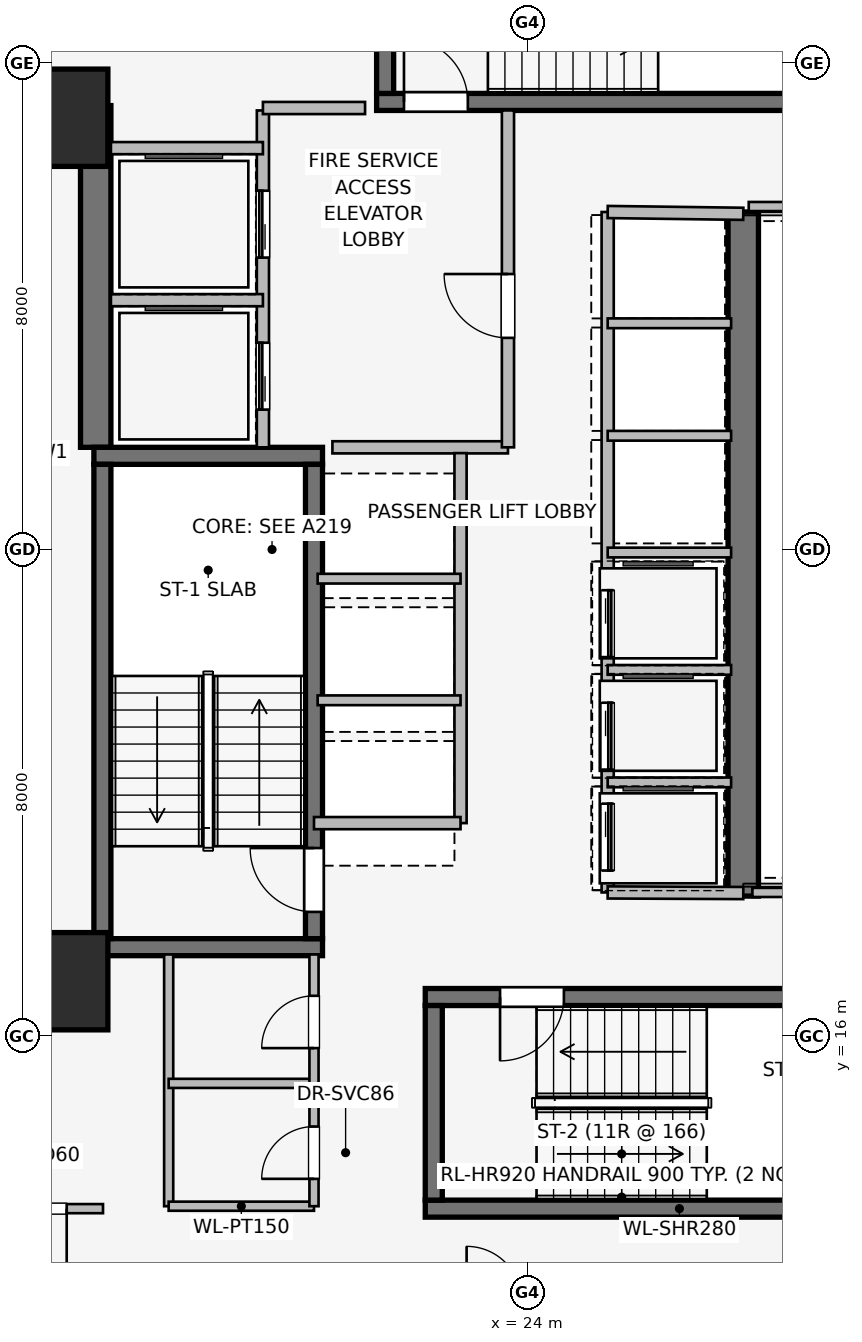
"""IFC4 building model, lengths in metres.
Left out: names, types, materials, properties, quantities, classifications, styles, units other than length and angle.
Written with IfcOpenShell. Run it as: python <this file> out.ifc"""

import sys

from ifc_helpers import new_model, si_unit, direction, frame, frame_2d, origin, origin_2d, place, context, subcontext, project, spatial, rectangle, extrude, element, fill, save


model = new_model("IFC4")
c1 = context("Model", 3, precision=1e-05, world=origin(), true_north=direction((0.0, 1.0)))
c2 = subcontext(c1, "Body", "Model", "MODEL_VIEW")
j1 = project(units=[si_unit("LENGTHUNIT", "METRE"), si_unit("PLANEANGLEUNIT", "RADIAN")], contexts=[c1])
p1 = place(None, origin())
s1 = spatial("IfcSite", under=j1, at=p1, CompositionType="ELEMENT")
p2 = place(p1, origin())
s2 = spatial("IfcBuilding", under=s1, at=p2, CompositionType="ELEMENT")
p3 = place(p2, frame((0.0, 0.0, 67.15)))
s3 = spatial("IfcBuildingStorey", under=s2, at=p3, CompositionType="ELEMENT", Elevation=67.15)
p4 = place(p3, frame((16.9, 25.68, 0.0), z_axis=(0.0, 0.0, 1.0), x_axis=(0.0, 1.0, 0.0)))
e1 = element("IfcWall", 1, at=p4, inside=s3, PredefinedType="SHEAR", context=c2, shape_type="SweptSolid", body=[
    extrude(rectangle(XDim=5.62, YDim=0.5, at=frame_2d((2.81, 0.0))), origin(), (0.0, 0.0, 1.0), 3.65),
])
p5 = place(p3, frame((27.55, 29.55, 0.0), z_axis=(0.0, 0.0, 1.0), x_axis=(0.0, -1.0, 0.0)))
e2 = element("IfcWall", 2, at=p5, inside=s3, PredefinedType="SHEAR", context=c2, shape_type="SweptSolid", body=[
    extrude(rectangle(XDim=11.25, YDim=0.5, at=frame_2d((5.625, 0.0))), origin(), (0.0, 0.0, 1.0), 3.65),
])
for number, where, z_axis, x_axis in (
    (3, (16.87, 17.46, 0.0), (0.0, 0.0, 1.0), (1.0, 0.0, 0.0)),
    (4, (20.63, 25.54, 0.0), (0.0, 0.0, 1.0), (-1.0, 0.0, 0.0)),
):
    element("IfcWall", number, at=place(p3, frame(where, z_axis=z_axis, x_axis=x_axis)), inside=s3, PredefinedType="SHEAR", context=c2, shape_type="SweptSolid", body=[
        extrude(rectangle(XDim=3.76, YDim=0.28, at=frame_2d((1.88, 0.0))), origin(), (0.0, 0.0, 1.0), 3.65),
    ])
p6 = place(p3, frame((17.01, 25.4, 0.0), z_axis=(0.0, 0.0, 1.0), x_axis=(0.0, -1.0, 0.0)))
e5 = element("IfcWall", 5, at=p6, inside=s3, PredefinedType="SHEAR", context=c2, shape_type="SweptSolid", body=[
    extrude(rectangle(XDim=7.8, YDim=0.28, at=frame_2d((3.9, 0.0))), origin(), (0.0, 0.0, 1.0), 3.65),
])
p7 = place(p3, frame((20.49, 17.6, 0.0), z_axis=(0.0, 0.0, 1.0), x_axis=(0.0, 1.0, 0.0)))
e6 = element("IfcWall", 6, at=p7, inside=s3, PredefinedType="SHEAR", context=c2, shape_type="SweptSolid", body=[
    extrude(rectangle(XDim=7.8, YDim=0.28, at=frame_2d((3.9, 0.0))), origin(), (0.0, 0.0, 1.0), 3.65),
])
p8 = place(p7, frame((0.44, 0.0, 0.0)))
e7 = element("IfcOpeningElement", 7, at=p8, cuts=e6, PredefinedType="OPENING", context=c2, shape_type="SweptSolid", body=[
    extrude(rectangle(XDim=1.05, YDim=2.0, at=frame_2d((0.525, 1.0))), frame((0.0, 0.15, 0.0), z_axis=(0.0, -1.0, 0.0), x_axis=(1.0, 0.0, 0.0)), (0.0, 0.0, 1.0), 0.3),
])
p9 = place(p3, frame((22.32, 13.16, 0.0), z_axis=(0.0, 0.0, 1.0), x_axis=(1.0, 0.0, 0.0)))
e8 = element("IfcWall", 8, at=p9, inside=s3, PredefinedType="SHEAR", context=c2, shape_type="SweptSolid", body=[
    extrude(rectangle(XDim=8.36, YDim=0.28, at=frame_2d((4.18, 0.0))), origin(), (0.0, 0.0, 1.0), 3.65),
])
p10 = place(p3, frame((30.68, 16.64, 0.0), z_axis=(0.0, 0.0, 1.0), x_axis=(-1.0, 0.0, 0.0)))
e9 = element("IfcWall", 9, at=p10, inside=s3, PredefinedType="SHEAR", context=c2, shape_type="SweptSolid", body=[
    extrude(rectangle(XDim=8.36, YDim=0.28, at=frame_2d((4.18, 0.0))), origin(), (0.0, 0.0, 1.0), 3.65),
])
p11 = place(p10, frame((6.08, 0.0, 0.0)))
e10 = element("IfcOpeningElement", 10, at=p11, cuts=e9, PredefinedType="OPENING", context=c2, shape_type="SweptSolid", body=[
    extrude(rectangle(XDim=1.05, YDim=2.0, at=frame_2d((0.525, 1.0))), frame((0.0, 0.15, 0.0), z_axis=(0.0, -1.0, 0.0), x_axis=(1.0, 0.0, 0.0)), (0.0, 0.0, 1.0), 0.3),
])
p12 = place(p3, frame((22.46, 16.5, 0.0), z_axis=(0.0, 0.0, 1.0), x_axis=(0.0, -1.0, 0.0)))
e11 = element("IfcWall", 11, at=p12, inside=s3, PredefinedType="SHEAR", context=c2, shape_type="SweptSolid", body=[
    extrude(rectangle(XDim=3.2, YDim=0.28, at=frame_2d((1.6, 0.0))), origin(), (0.0, 0.0, 1.0), 3.65),
])
p13 = place(p3, frame((21.52, 31.36, 0.0), z_axis=(0.0, 0.0, 1.0), x_axis=(1.0, 0.0, 0.0)))
e12 = element("IfcWall", 12, at=p13, inside=s3, PredefinedType="SHEAR", context=c2, shape_type="SweptSolid", body=[
    extrude(rectangle(XDim=8.36, YDim=0.28, at=frame_2d((4.18, 0.0))), origin(), (0.0, 0.0, 1.0), 3.65),
])
p14 = place(p13, frame((0.45, 0.0, 0.0)))
e13 = element("IfcOpeningElement", 13, at=p14, cuts=e12, PredefinedType="OPENING", context=c2, shape_type="SweptSolid", body=[
    extrude(rectangle(XDim=1.05, YDim=2.0, at=frame_2d((0.525, 1.0))), frame((0.0, 0.15, 0.0), z_axis=(0.0, -1.0, 0.0), x_axis=(1.0, 0.0, 0.0)), (0.0, 0.0, 1.0), 0.3),
])
p15 = place(p3, frame((21.66, 34.7, 0.0), z_axis=(0.0, 0.0, 1.0), x_axis=(0.0, -1.0, 0.0)))
e14 = element("IfcWall", 14, at=p15, inside=s3, PredefinedType="SHEAR", context=c2, shape_type="SweptSolid", body=[
    extrude(rectangle(XDim=3.2, YDim=0.28, at=frame_2d((1.6, 0.0))), origin(), (0.0, 0.0, 1.0), 3.65),
])
for number, where, z_axis, x_axis in (
    (15, (16.3, 16.9, 0.0), (0.0, 0.0, 1.0), (1.0, 0.0, 0.0)),
    (16, (16.3, 31.1, 0.0), (0.0, 0.0, 1.0), (1.0, 0.0, 0.0)),
):
    element("IfcColumn", number, at=place(p3, frame(where, z_axis=z_axis, x_axis=x_axis)), inside=s3, PredefinedType="COLUMN", context=c2, shape_type="SweptSolid", body=[
        extrude(rectangle(XDim=1.6, YDim=1.6, at=origin_2d()), origin(), (0.0, 0.0, 1.0), 3.65),
    ])
p16 = place(p3, frame((19.65, 25.68, 0.0), z_axis=(0.0, 0.0, 1.0), x_axis=(0.0, 1.0, 0.0)))
e17 = element("IfcWall", 17, at=p16, inside=s3, PredefinedType="PARTITIONING", context=c2, shape_type="SweptSolid", body=[
    extrude(rectangle(XDim=5.54, YDim=0.2, at=frame_2d((2.77, 0.0))), origin(), (0.0, 0.0, 1.0), 3.39),
])
p17 = place(p16, frame((0.62, 0.0, 0.0)))
e18 = element("IfcOpeningElement", 18, at=p17, cuts=e17, PredefinedType="OPENING", context=c2, shape_type="SweptSolid", body=[
    extrude(rectangle(XDim=1.1, YDim=2.2, at=frame_2d((0.55, 1.1))), frame((0.0, 0.11, 0.0), z_axis=(0.0, -1.0, 0.0), x_axis=(1.0, 0.0, 0.0)), (0.0, 0.0, 1.0), 0.22),
])
p18 = place(p16, frame((3.12, 0.0, 0.0)))
e19 = element("IfcOpeningElement", 19, at=p18, cuts=e17, PredefinedType="OPENING", context=c2, shape_type="SweptSolid", body=[
    extrude(rectangle(XDim=1.1, YDim=2.2, at=frame_2d((0.55, 1.1))), frame((0.0, 0.11, 0.0), z_axis=(0.0, -1.0, 0.0), x_axis=(1.0, 0.0, 0.0)), (0.0, 0.0, 1.0), 0.22),
])
p19 = place(p3, frame((20.793, 25.68, 0.0), z_axis=(0.0, 0.0, 1.0), x_axis=(1.0, 0.0, 0.0)))
e20 = element("IfcWall", 20, at=p19, inside=s3, PredefinedType="PARTITIONING", context=c2, shape_type="SweptSolid", body=[
    extrude(rectangle(XDim=2.887, YDim=0.2, at=frame_2d((1.443, 0.0))), origin(), (0.0, 0.0, 1.0), 3.39),
])
p20 = place(p3, frame((23.68, 25.68, 0.0), z_axis=(0.0, 0.0, 1.0), x_axis=(0.0, 1.0, 0.0)))
e21 = element("IfcWall", 21, at=p20, inside=s3, PredefinedType="PARTITIONING", context=c2, shape_type="SweptSolid", body=[
    extrude(rectangle(XDim=5.54, YDim=0.2, at=frame_2d((2.77, 0.0))), origin(), (0.0, 0.0, 1.0), 3.39),
])
p21 = place(p20, frame((1.8, 0.0, 0.0)))
e22 = element("IfcOpeningElement", 22, at=p21, cuts=e21, PredefinedType="OPENING", context=c2, shape_type="SweptSolid", body=[
    extrude(rectangle(XDim=1.05, YDim=2.0, at=frame_2d((0.525, 1.0))), frame((0.0, 0.11, 0.0), z_axis=(0.0, -1.0, 0.0), x_axis=(1.0, 0.0, 0.0)), (0.0, 0.0, 1.0), 0.22),
])
p22 = place(p3, frame((21.33, 31.26, 0.0), z_axis=(0.0, 0.0, 1.0), x_axis=(-1.0, 0.0, 0.0)))
e23 = element("IfcWall", 23, at=p22, inside=s3, PredefinedType="PARTITIONING", context=c2, shape_type="SweptSolid", body=[
    extrude(rectangle(XDim=1.68, YDim=0.2, at=frame_2d((0.84, 0.0))), origin(), (0.0, 0.0, 1.0), 3.39),
])
p23 = place(p3, frame((17.15, 28.1, 0.0), z_axis=(0.0, 0.0, 1.0), x_axis=(1.0, 0.0, 0.0)))
e24 = element("IfcWall", 24, at=p23, inside=s3, PredefinedType="PARTITIONING", context=c2, shape_type="SweptSolid", body=[
    extrude(rectangle(XDim=2.5, YDim=0.2, at=frame_2d((1.25, 0.0))), origin(), (0.0, 0.0, 1.0), 3.39),
])
p24 = place(p3, frame((19.65, 30.6, 0.0), z_axis=(0.0, 0.0, 1.0), x_axis=(-1.0, 0.0, 0.0)))
e25 = element("IfcWall", 25, at=p24, inside=s3, PredefinedType="PARTITIONING", context=c2, shape_type="SweptSolid", body=[
    extrude(rectangle(XDim=2.5, YDim=0.2, at=frame_2d((1.25, 0.0))), origin(), (0.0, 0.0, 1.0), 2.29),
])
p25 = place(p3, frame((22.9, 19.5, 0.0), z_axis=(0.0, 0.0, 1.0), x_axis=(0.0, 1.0, 0.0)))
e26 = element("IfcWall", 26, at=p25, inside=s3, PredefinedType="PARTITIONING", context=c2, shape_type="SweptSolid", body=[
    extrude(rectangle(XDim=6.085, YDim=0.2, at=frame_2d((3.042, 0.0))), origin(), (0.0, 0.0, 1.0), 3.39),
])
p26 = place(p3, frame((20.49, 19.5, 0.0), z_axis=(0.0, 0.0, 1.0), x_axis=(1.0, 0.0, 0.0)))
e27 = element("IfcWall", 27, at=p26, inside=s3, PredefinedType="PARTITIONING", context=c2, shape_type="SweptSolid", body=[
    extrude(rectangle(XDim=2.41, YDim=0.2, at=frame_2d((1.205, 0.0))), origin(), (0.0, 0.0, 1.0), 2.29),
])
for number, where, z_axis, x_axis in (
    (28, (20.55, 21.52, 0.0), (0.0, 0.0, 1.0), (1.0, 0.0, 0.0)),
    (29, (20.55, 23.52, 0.0), (0.0, 0.0, 1.0), (1.0, 0.0, 0.0)),
):
    element("IfcWall", number, at=place(p3, frame(where, z_axis=z_axis, x_axis=x_axis)), inside=s3, PredefinedType="PARTITIONING", context=c2, shape_type="SweptSolid", body=[
        extrude(rectangle(XDim=2.35, YDim=0.16, at=frame_2d((1.175, 0.0))), origin(), (0.0, 0.0, 1.0), 3.39),
    ])
p27 = place(p3, frame((25.32, 29.55, 0.0), z_axis=(0.0, 0.0, 1.0), x_axis=(0.0, -1.0, 0.0)))
e30 = element("IfcWall", 30, at=p27, inside=s3, PredefinedType="PARTITIONING", context=c2, shape_type="SweptSolid", body=[
    extrude(rectangle(XDim=11.19, YDim=0.2, at=frame_2d((5.595, 0.0))), origin(), (0.0, 0.0, 1.0), 3.39),
])
p28 = place(p27, frame((6.22, 0.0, 0.0)))
e31 = element("IfcOpeningElement", 31, at=p28, cuts=e30, PredefinedType="OPENING", context=c2, shape_type="SweptSolid", body=[
    extrude(rectangle(XDim=1.1, YDim=2.2, at=frame_2d((0.55, 1.1))), frame((0.0, 0.11, 0.0), z_axis=(0.0, -1.0, 0.0), x_axis=(1.0, 0.0, 0.0)), (0.0, 0.0, 1.0), 0.22),
])
p29 = place(p27, frame((8.07, 0.0, 0.0)))
e32 = element("IfcOpeningElement", 32, at=p29, cuts=e30, PredefinedType="OPENING", context=c2, shape_type="SweptSolid", body=[
    extrude(rectangle(XDim=1.1, YDim=2.2, at=frame_2d((0.55, 1.1))), frame((0.0, 0.11, 0.0), z_axis=(0.0, -1.0, 0.0), x_axis=(1.0, 0.0, 0.0)), (0.0, 0.0, 1.0), 0.22),
])
p30 = place(p27, frame((9.73, 0.0, 0.0)))
e33 = element("IfcOpeningElement", 33, at=p30, cuts=e30, PredefinedType="OPENING", context=c2, shape_type="SweptSolid", body=[
    extrude(rectangle(XDim=1.1, YDim=2.2, at=frame_2d((0.55, 1.1))), frame((0.0, 0.11, 0.0), z_axis=(0.0, -1.0, 0.0), x_axis=(1.0, 0.0, 0.0)), (0.0, 0.0, 1.0), 0.22),
])
p31 = place(p3, frame((25.32, 18.36, 0.0), z_axis=(0.0, 0.0, 1.0), x_axis=(0.999989925833, -0.004488678231, 0.0)))
e34 = element("IfcWall", 34, at=p31, inside=s3, PredefinedType="PARTITIONING", context=c2, shape_type="SweptSolid", body=[
    extrude(rectangle(XDim=2.23, YDim=0.2, at=frame_2d((1.115, 0.0))), origin(), (0.0, 0.0, 1.0), 3.39),
])
p32 = place(p3, frame((27.55, 29.52, 0.0), z_axis=(0.0, 0.0, 1.0), x_axis=(-0.999909343457, 0.013464949556, 0.0)))
e35 = element("IfcWall", 35, at=p32, inside=s3, PredefinedType="PARTITIONING", context=c2, shape_type="SweptSolid", body=[
    extrude(rectangle(XDim=2.23, YDim=0.2, at=frame_2d((1.115, 0.0))), origin(), (0.0, 0.0, 1.0), 2.29),
])
for number, where, z_axis, x_axis in (
    (36, (25.32, 20.17, 0.0), (0.0, 0.0, 1.0), (1.0, 0.0, 0.0)),
    (37, (25.32, 22.02, 0.0), (0.0, 0.0, 1.0), (1.0, 0.0, 0.0)),
    (38, (25.32, 23.95, 0.0), (0.0, 0.0, 1.0), (1.0, 0.0, 0.0)),
    (39, (25.32, 25.87, 0.0), (0.0, 0.0, 1.0), (1.0, 0.0, 0.0)),
    (40, (25.32, 27.72, 0.0), (0.0, 0.0, 1.0), (1.0, 0.0, 0.0)),
):
    element("IfcWall", number, at=place(p3, frame(where, z_axis=z_axis, x_axis=x_axis)), inside=s3, PredefinedType="PARTITIONING", context=c2, shape_type="SweptSolid", body=[
        extrude(rectangle(XDim=2.03, YDim=0.16, at=frame_2d((1.015, 0.0))), origin(), (0.0, 0.0, 1.0), 3.39),
    ])
p33 = place(p3, frame((18.1, 17.34, 0.0), z_axis=(0.0, 0.0, 1.0), x_axis=(0.0, -1.0, 0.0)))
e41 = element("IfcWall", 41, at=p33, inside=s3, PredefinedType="PARTITIONING", context=c2, shape_type="SweptSolid", body=[
    extrude(rectangle(XDim=4.14, YDim=0.15, at=frame_2d((2.07, 0.0))), origin(), (0.0, 0.0, 1.0), 3.39),
])
for number, where, z_axis, x_axis in (
    (42, (18.1, 13.2, 0.0), (0.0, 0.0, 1.0), (1.0, 0.0, 0.0)),
    (43, (18.1, 15.22, 0.0), (0.0, 0.0, 1.0), (1.0, 0.0, 0.0)),
):
    element("IfcWall", number, at=place(p3, frame(where, z_axis=z_axis, x_axis=x_axis)), inside=s3, PredefinedType="PARTITIONING", context=c2, shape_type="SweptSolid", body=[
        extrude(rectangle(XDim=2.39, YDim=0.15, at=frame_2d((1.195, 0.0))), origin(), (0.0, 0.0, 1.0), 3.39),
    ])
p34 = place(p3, frame((20.49, 13.2, 0.0), z_axis=(0.0, 0.0, 1.0), x_axis=(0.0, 1.0, 0.0)))
e44 = element("IfcWall", 44, at=p34, inside=s3, PredefinedType="PARTITIONING", context=c2, shape_type="SweptSolid", body=[
    extrude(rectangle(XDim=4.14, YDim=0.15, at=frame_2d((2.07, 0.0))), origin(), (0.0, 0.0, 1.0), 3.39),
])
p35 = place(p34, frame((0.45, 0.0, 0.0)))
e45 = element("IfcOpeningElement", 45, at=p35, cuts=e44, PredefinedType="OPENING", context=c2, shape_type="SweptSolid", body=[
    extrude(rectangle(XDim=0.86, YDim=2.0, at=frame_2d((0.43, 1.0))), frame((0.0, 0.085, 0.0), z_axis=(0.0, -1.0, 0.0), x_axis=(1.0, 0.0, 0.0)), (0.0, 0.0, 1.0), 0.17),
])
p36 = place(p34, frame((2.6, 0.0, 0.0)))
e46 = element("IfcOpeningElement", 46, at=p36, cuts=e44, PredefinedType="OPENING", context=c2, shape_type="SweptSolid", body=[
    extrude(rectangle(XDim=0.86, YDim=2.0, at=frame_2d((0.43, 1.0))), frame((0.0, 0.085, 0.0), z_axis=(0.0, -1.0, 0.0), x_axis=(1.0, 0.0, 0.0)), (0.0, 0.0, 1.0), 0.17),
])
p37 = place(p3, frame((27.7, 18.36, 0.0), z_axis=(0.0, 0.0, 1.0), x_axis=(1.0, 0.0, 0.0)))
e47 = element("IfcWall", 47, at=p37, inside=s3, PredefinedType="PARTITIONING", context=c2, shape_type="SweptSolid", body=[
    extrude(rectangle(XDim=12.14, YDim=0.15, at=frame_2d((6.07, 0.0))), origin(), (0.0, 0.0, 1.0), 2.531),
])
p38 = place(p3, frame((39.84, 29.64, 0.0), z_axis=(0.0, 0.0, 1.0), x_axis=(-1.0, 0.0, 0.0)))
e48 = element("IfcWall", 48, at=p38, inside=s3, PredefinedType="PARTITIONING", context=c2, shape_type="SweptSolid", body=[
    extrude(rectangle(XDim=12.2, YDim=0.15, at=frame_2d((6.1, 0.0))), origin(), (0.0, 0.0, 1.0), 2.531),
])
p39 = place(p3, frame((17.02, 13.16, 0.0), z_axis=(0.0, 0.0, 1.0), x_axis=(-1.0, 0.0, 0.0)))
e49 = element("IfcWall", 49, at=p39, inside=s3, PredefinedType="PARTITIONING", context=c2, shape_type="SweptSolid", body=[
    extrude(rectangle(XDim=2.12, YDim=0.15, at=frame_2d((1.06, 0.0))), origin(), (0.0, 0.0, 1.0), 3.39),
])
p40 = place(p39, frame((0.597, 0.0, 0.0)))
e50 = element("IfcOpeningElement", 50, at=p40, cuts=e49, PredefinedType="OPENING", context=c2, shape_type="SweptSolid", body=[
    extrude(rectangle(XDim=0.96, YDim=2.0, at=frame_2d((0.48, 1.0))), frame((0.0, 0.085, 0.0), z_axis=(0.0, -1.0, 0.0), x_axis=(1.0, 0.0, 0.0)), (0.0, 0.0, 1.0), 0.17),
])
p41 = place(p8, origin())
e51 = element("IfcDoor", 51, at=p41, inside=s3, OperationType="SINGLE_SWING_RIGHT", PredefinedType="DOOR", context=c2, shape_type="SweptSolid", body=[
    extrude(rectangle(XDim=1.05, YDim=2.0, at=frame_2d((0.525, 1.0))), frame((0.0, 0.025, 0.0), z_axis=(0.0, -1.0, 0.0), x_axis=(1.0, 0.0, 0.0)), (0.0, 0.0, 1.0), 0.05),
])
fill(e7, e51)
p42 = place(p11, origin())
e52 = element("IfcDoor", 52, at=p42, inside=s3, OperationType="SINGLE_SWING_RIGHT", PredefinedType="DOOR", context=c2, shape_type="SweptSolid", body=[
    extrude(rectangle(XDim=1.05, YDim=2.0, at=frame_2d((0.525, 1.0))), frame((0.0, 0.025, 0.0), z_axis=(0.0, -1.0, 0.0), x_axis=(1.0, 0.0, 0.0)), (0.0, 0.0, 1.0), 0.05),
])
fill(e10, e52)
p43 = place(p14, origin())
e53 = element("IfcDoor", 53, at=p43, inside=s3, OperationType="SINGLE_SWING_LEFT", PredefinedType="DOOR", context=c2, shape_type="SweptSolid", body=[
    extrude(rectangle(XDim=1.05, YDim=2.0, at=frame_2d((0.525, 1.0))), frame((0.0, 0.025, 0.0), z_axis=(0.0, -1.0, 0.0), x_axis=(1.0, 0.0, 0.0)), (0.0, 0.0, 1.0), 0.05),
])
fill(e13, e53)
p44 = place(p17, origin())
e54 = element("IfcDoor", 54, at=p44, inside=s3, OperationType="SLIDING_TO_LEFT", PredefinedType="DOOR", context=c2, shape_type="SweptSolid", body=[
    extrude(rectangle(XDim=1.1, YDim=2.2, at=frame_2d((0.55, 1.1))), frame((0.0, 0.025, 0.0), z_axis=(0.0, -1.0, 0.0), x_axis=(1.0, 0.0, 0.0)), (0.0, 0.0, 1.0), 0.05),
])
fill(e18, e54)
p45 = place(p18, origin())
e55 = element("IfcDoor", 55, at=p45, inside=s3, OperationType="SLIDING_TO_LEFT", PredefinedType="DOOR", context=c2, shape_type="SweptSolid", body=[
    extrude(rectangle(XDim=1.1, YDim=2.2, at=frame_2d((0.55, 1.1))), frame((0.0, 0.025, 0.0), z_axis=(0.0, -1.0, 0.0), x_axis=(1.0, 0.0, 0.0)), (0.0, 0.0, 1.0), 0.05),
])
fill(e19, e55)
p46 = place(p21, origin())
e56 = element("IfcDoor", 56, at=p46, inside=s3, OperationType="SINGLE_SWING_RIGHT", PredefinedType="DOOR", context=c2, shape_type="SweptSolid", body=[
    extrude(rectangle(XDim=1.05, YDim=2.0, at=frame_2d((0.525, 1.0))), frame((0.0, 0.025, 0.0), z_axis=(0.0, -1.0, 0.0), x_axis=(1.0, 0.0, 0.0)), (0.0, 0.0, 1.0), 0.05),
])
fill(e22, e56)
p47 = place(p28, origin())
e57 = element("IfcDoor", 57, at=p47, inside=s3, OperationType="SLIDING_TO_LEFT", PredefinedType="DOOR", context=c2, shape_type="SweptSolid", body=[
    extrude(rectangle(XDim=1.1, YDim=2.2, at=frame_2d((0.55, 1.1))), frame((0.0, 0.025, 0.0), z_axis=(0.0, -1.0, 0.0), x_axis=(1.0, 0.0, 0.0)), (0.0, 0.0, 1.0), 0.05),
])
fill(e31, e57)
p48 = place(p29, origin())
e58 = element("IfcDoor", 58, at=p48, inside=s3, OperationType="SLIDING_TO_LEFT", PredefinedType="DOOR", context=c2, shape_type="SweptSolid", body=[
    extrude(rectangle(XDim=1.1, YDim=2.2, at=frame_2d((0.55, 1.1))), frame((0.0, 0.025, 0.0), z_axis=(0.0, -1.0, 0.0), x_axis=(1.0, 0.0, 0.0)), (0.0, 0.0, 1.0), 0.05),
])
fill(e32, e58)
p49 = place(p30, origin())
e59 = element("IfcDoor", 59, at=p49, inside=s3, OperationType="SLIDING_TO_LEFT", PredefinedType="DOOR", context=c2, shape_type="SweptSolid", body=[
    extrude(rectangle(XDim=1.1, YDim=2.2, at=frame_2d((0.55, 1.1))), frame((0.0, 0.025, 0.0), z_axis=(0.0, -1.0, 0.0), x_axis=(1.0, 0.0, 0.0)), (0.0, 0.0, 1.0), 0.05),
])
fill(e33, e59)
p50 = place(p35, origin())
e60 = element("IfcDoor", 60, at=p50, inside=s3, OperationType="SINGLE_SWING_LEFT", PredefinedType="DOOR", context=c2, shape_type="SweptSolid", body=[
    extrude(rectangle(XDim=0.86, YDim=2.0, at=frame_2d((0.43, 1.0))), frame((0.0, 0.025, 0.0), z_axis=(0.0, -1.0, 0.0), x_axis=(1.0, 0.0, 0.0)), (0.0, 0.0, 1.0), 0.05),
])
fill(e45, e60)
p51 = place(p36, origin())
e61 = element("IfcDoor", 61, at=p51, inside=s3, OperationType="SINGLE_SWING_LEFT", PredefinedType="DOOR", context=c2, shape_type="SweptSolid", body=[
    extrude(rectangle(XDim=0.86, YDim=2.0, at=frame_2d((0.43, 1.0))), frame((0.0, 0.025, 0.0), z_axis=(0.0, -1.0, 0.0), x_axis=(1.0, 0.0, 0.0)), (0.0, 0.0, 1.0), 0.05),
])
fill(e46, e61)
p52 = place(p40, origin())
e62 = element("IfcDoor", 62, at=p52, inside=s3, OperationType="SINGLE_SWING_LEFT", PredefinedType="DOOR", context=c2, shape_type="SweptSolid", body=[
    extrude(rectangle(XDim=0.96, YDim=2.0, at=frame_2d((0.48, 1.0))), frame((0.0, 0.025, 0.0), z_axis=(0.0, -1.0, 0.0), x_axis=(1.0, 0.0, 0.0)), (0.0, 0.0, 1.0), 0.05),
])
fill(e50, e62)
save(model, sys.argv[1])
